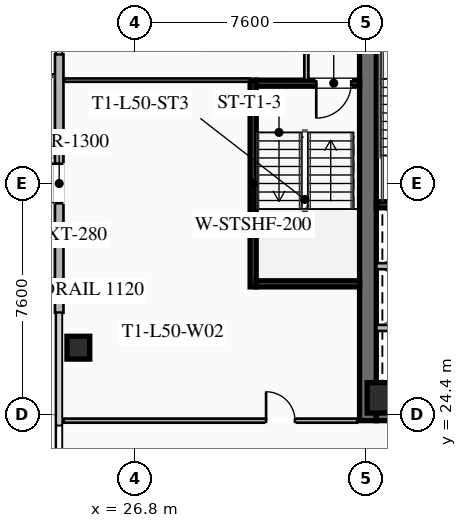
"""IFC4 building model, lengths in metres.
Left out: names, types, materials, properties, quantities, classifications, styles, units other than length and angle.
Written with IfcOpenShell. Run it as: python <this file> out.ifc"""

import sys

from ifc_helpers import new_model, si_unit, direction, frame, frame_2d, origin, origin_2d, place, context, subcontext, project, spatial, rectangle, hollow_rectangle, extrude, element, fill, save


model = new_model("IFC4")
c1 = context("Model", 3, precision=1e-05, world=origin(), true_north=direction((0.0, 1.0)))
c2 = subcontext(c1, "Body", "Model", "MODEL_VIEW")
j1 = project(units=[si_unit("LENGTHUNIT", "METRE"), si_unit("PLANEANGLEUNIT", "RADIAN")], contexts=[c1])
p1 = place(None, origin())
s1 = spatial("IfcSite", under=j1, at=p1, CompositionType="ELEMENT")
p2 = place(p1, origin())
s2 = spatial("IfcBuilding", under=s1, at=p2, CompositionType="ELEMENT")
p3 = place(p2, frame((0.0, 0.0, 185.4)))
s3 = spatial("IfcBuildingStorey", under=s2, at=p3, CompositionType="ELEMENT", Elevation=185.4)
p4 = place(p3, frame((34.475, 24.2, 0.0), z_axis=(0.0, 0.0, 1.0), x_axis=(0.0, 1.0, 0.0)))
e1 = element("IfcWall", 1, at=p4, inside=s3, PredefinedType="SHEAR", context=c2, shape_type="SweptSolid", body=[
    extrude(rectangle(XDim=15.6, YDim=0.55, at=frame_2d((7.8, 0.0))), origin(), (0.0, 0.0, 1.0), 3.55),
])
p5 = place(p3, frame((49.25, 24.475, 0.0), z_axis=(0.0, 0.0, 1.0), x_axis=(-1.0, 0.0, 0.0)))
e2 = element("IfcWall", 2, at=p5, inside=s3, PredefinedType="SHEAR", context=c2, shape_type="SweptSolid", body=[
    extrude(rectangle(XDim=14.5, YDim=0.55, at=frame_2d((7.25, 0.0))), origin(), (0.0, 0.0, 1.0), 3.55),
])
p6 = place(p5, frame((8.95, 0.0, 0.0)))
e3 = element("IfcOpeningElement", 3, at=p6, cuts=e2, PredefinedType="OPENING", context=c2, shape_type="SweptSolid", body=[
    extrude(rectangle(XDim=1.25, YDim=2.25, at=frame_2d((0.625, 1.125))), frame((0.0, 0.285, 0.0), z_axis=(0.0, -1.0, 0.0), x_axis=(1.0, 0.0, 0.0)), (0.0, 0.0, 1.0), 0.57),
])
p7 = place(p5, frame((3.9, 0.0, 0.0)))
e4 = element("IfcOpeningElement", 4, at=p7, cuts=e2, PredefinedType="OPENING", context=c2, shape_type="SweptSolid", body=[
    extrude(rectangle(XDim=1.25, YDim=2.25, at=frame_2d((0.625, 1.125))), frame((0.0, 0.285, 0.0), z_axis=(0.0, -1.0, 0.0), x_axis=(1.0, 0.0, 0.0)), (0.0, 0.0, 1.0), 0.57),
])
p8 = place(p3, frame((34.95, 24.95, 0.0), z_axis=(0.0, 0.0, 1.0), x_axis=(1.0, 0.0, 0.0)))
e5 = element("IfcColumn", 5, at=p8, inside=s3, PredefinedType="COLUMN", context=c2, shape_type="SweptSolid", body=[
    extrude(hollow_rectangle(XDim=1.0, YDim=1.0, WallThickness=0.04, at=origin_2d()), origin(), (0.0, 0.0, 1.0), 3.37),
])
p9 = place(p3, frame((24.95, 26.6, 0.0), z_axis=(0.0, 0.0, 1.0), x_axis=(1.0, 0.0, 0.0)))
e6 = element("IfcColumn", 6, at=p9, inside=s3, PredefinedType="COLUMN", context=c2, shape_type="SweptSolid", body=[
    extrude(hollow_rectangle(XDim=0.75, YDim=0.75, WallThickness=0.032, at=origin_2d()), origin(), (0.0, 0.0, 1.0), 3.37),
])
p10 = place(p3, frame((24.32, 27.75, 0.0), z_axis=(0.0, 0.0, 1.0), x_axis=(0.0, 1.0, 0.0)))
e7 = element("IfcWall", 7, at=p10, inside=s3, PredefinedType="SOLIDWALL", context=c2, shape_type="SweptSolid", body=[
    extrude(rectangle(XDim=8.5, YDim=0.28, at=frame_2d((4.25, 0.0))), origin(), (0.0, 0.0, 1.0), 3.37),
])
p11 = place(p10, frame((3.6, 0.0, 0.0)))
e8 = element("IfcOpeningElement", 8, at=p11, cuts=e7, PredefinedType="OPENING", context=c2, shape_type="SweptSolid", body=[
    extrude(rectangle(XDim=1.3, YDim=2.15, at=frame_2d((0.65, 1.075))), frame((0.0, 0.15, 0.0), z_axis=(0.0, -1.0, 0.0), x_axis=(1.0, 0.0, 0.0)), (0.0, 0.0, 1.0), 0.3),
])
p12 = place(p3, frame((34.75, 31.3, 0.0), z_axis=(0.0, 0.0, 1.0), x_axis=(1.0, 0.0, 0.0)))
e9 = element("IfcWall", 9, at=p12, inside=s3, PredefinedType="SHEAR", context=c2, shape_type="SweptSolid", body=[
    extrude(rectangle(XDim=3.55, YDim=0.2, at=frame_2d((1.775, 0.0))), origin(), (0.0, 0.0, 1.0), 3.37),
])
for number, where, z_axis, x_axis in (
    (10, (34.75, 27.25, 0.0), (0.0, 0.0, 1.0), (1.0, 0.0, 0.0)),
    (11, (34.75, 29.28, 0.0), (0.0, 0.0, 1.0), (1.0, 0.0, 0.0)),
):
    element("IfcWall", number, at=place(p3, frame(where, z_axis=z_axis, x_axis=x_axis)), inside=s3, PredefinedType="SOLIDWALL", context=c2, shape_type="SweptSolid", body=[
        extrude(rectangle(XDim=3.2, YDim=0.2, at=frame_2d((1.6, 0.0))), origin(), (0.0, 0.0, 1.0), 3.37),
    ])
p13 = place(p3, frame((30.7, 28.6, 0.0), z_axis=(0.0, 0.0, 1.0), x_axis=(0.0, 1.0, 0.0)))
e12 = element("IfcWall", 12, at=p13, inside=s3, PredefinedType="SHEAR", context=c2, shape_type="SweptSolid", body=[
    extrude(rectangle(XDim=6.8, YDim=0.2, at=frame_2d((3.4, 0.0))), origin(), (0.0, 0.0, 1.0), 3.37),
])
p14 = place(p3, frame((34.2, 35.3, 0.0), z_axis=(0.0, 0.0, 1.0), x_axis=(-1.0, 0.0, 0.0)))
e13 = element("IfcWall", 13, at=p14, inside=s3, PredefinedType="SHEAR", context=c2, shape_type="SweptSolid", body=[
    extrude(rectangle(XDim=3.4, YDim=0.2, at=frame_2d((1.7, 0.0))), origin(), (0.0, 0.0, 1.0), 3.37),
])
p15 = place(p14, frame((0.275, 0.0, 0.0)))
e14 = element("IfcOpeningElement", 14, at=p15, cuts=e13, PredefinedType="OPENING", context=c2, shape_type="SweptSolid", body=[
    extrude(rectangle(XDim=1.15, YDim=2.2, at=frame_2d((0.575, 1.1))), frame((0.0, 0.11, 0.0), z_axis=(0.0, -1.0, 0.0), x_axis=(1.0, 0.0, 0.0)), (0.0, 0.0, 1.0), 0.22),
])
p16 = place(p3, frame((30.8, 28.7, 0.0), z_axis=(0.0, 0.0, 1.0), x_axis=(1.0, 0.0, 0.0)))
e15 = element("IfcWall", 15, at=p16, inside=s3, PredefinedType="SHEAR", context=c2, shape_type="SweptSolid", body=[
    extrude(rectangle(XDim=3.4, YDim=0.2, at=frame_2d((1.7, 0.0))), origin(), (0.0, 0.0, 1.0), 3.37),
])
p17 = place(p3, frame((32.45, 35.4, 0.0), z_axis=(0.0, 0.0, 1.0), x_axis=(0.0, 1.0, 0.0)))
e16 = element("IfcWall", 16, at=p17, inside=s3, PredefinedType="PARTITIONING", context=c2, shape_type="SweptSolid", body=[
    extrude(rectangle(XDim=4.4, YDim=0.135, at=frame_2d((2.2, 0.0))), origin(), (0.0, 0.0, 1.0), 2.723),
])
p18 = place(p3, frame((24.47, 24.2, 0.0), z_axis=(0.0, 0.0, 1.0), x_axis=(1.0, 0.0, 0.0)))
e17 = element("IfcWall", 17, at=p18, inside=s3, PredefinedType="PARTITIONING", context=c2, shape_type="SweptSolid", body=[
    extrude(rectangle(XDim=9.65, YDim=0.135, at=frame_2d((4.825, 0.0))), origin(), (0.0, 0.0, 1.0), 2.723),
])
p19 = place(p18, frame((6.655, 0.0, 0.0)))
e18 = element("IfcOpeningElement", 18, at=p19, cuts=e17, PredefinedType="OPENING", context=c2, shape_type="SweptSolid", body=[
    extrude(rectangle(XDim=0.95, YDim=2.05, at=frame_2d((0.475, 1.025))), frame((0.0, 0.077, 0.0), z_axis=(0.0, -1.0, 0.0), x_axis=(1.0, 0.0, 0.0)), (0.0, 0.0, 1.0), 0.155),
])
p20 = place(p3, frame((30.6, 35.4, 0.0), z_axis=(0.0, 0.0, 1.0), x_axis=(-1.0, 0.0, 0.0)))
e19 = element("IfcWall", 19, at=p20, inside=s3, PredefinedType="PARTITIONING", context=c2, shape_type="SweptSolid", body=[
    extrude(rectangle(XDim=6.13, YDim=0.11, at=frame_2d((3.065, 0.0))), origin(), (0.0, 0.0, 1.0), 2.723),
])
p21 = place(p11, origin())
e20 = element("IfcDoor", 20, at=p21, inside=s3, OperationType="SINGLE_SWING_RIGHT", PredefinedType="DOOR", context=c2, shape_type="SweptSolid", body=[
    extrude(rectangle(XDim=1.3, YDim=2.15, at=frame_2d((0.65, 1.075))), frame((0.0, 0.025, 0.0), z_axis=(0.0, -1.0, 0.0), x_axis=(1.0, 0.0, 0.0)), (0.0, 0.0, 1.0), 0.05),
])
fill(e8, e20)
p22 = place(p15, origin())
e21 = element("IfcDoor", 21, at=p22, inside=s3, OperationType="SINGLE_SWING_RIGHT", PredefinedType="DOOR", context=c2, shape_type="SweptSolid", body=[
    extrude(rectangle(XDim=1.15, YDim=2.2, at=frame_2d((0.575, 1.1))), frame((0.0, 0.025, 0.0), z_axis=(0.0, -1.0, 0.0), x_axis=(1.0, 0.0, 0.0)), (0.0, 0.0, 1.0), 0.05),
])
fill(e14, e21)
p23 = place(p19, origin())
e22 = element("IfcDoor", 22, at=p23, inside=s3, OperationType="SINGLE_SWING_LEFT", PredefinedType="DOOR", context=c2, shape_type="SweptSolid", body=[
    extrude(rectangle(XDim=0.95, YDim=2.05, at=frame_2d((0.475, 1.025))), frame((0.0, 0.025, 0.0), z_axis=(0.0, -1.0, 0.0), x_axis=(1.0, 0.0, 0.0)), (0.0, 0.0, 1.0), 0.05),
])
fill(e18, e22)
save(model, sys.argv[1])
